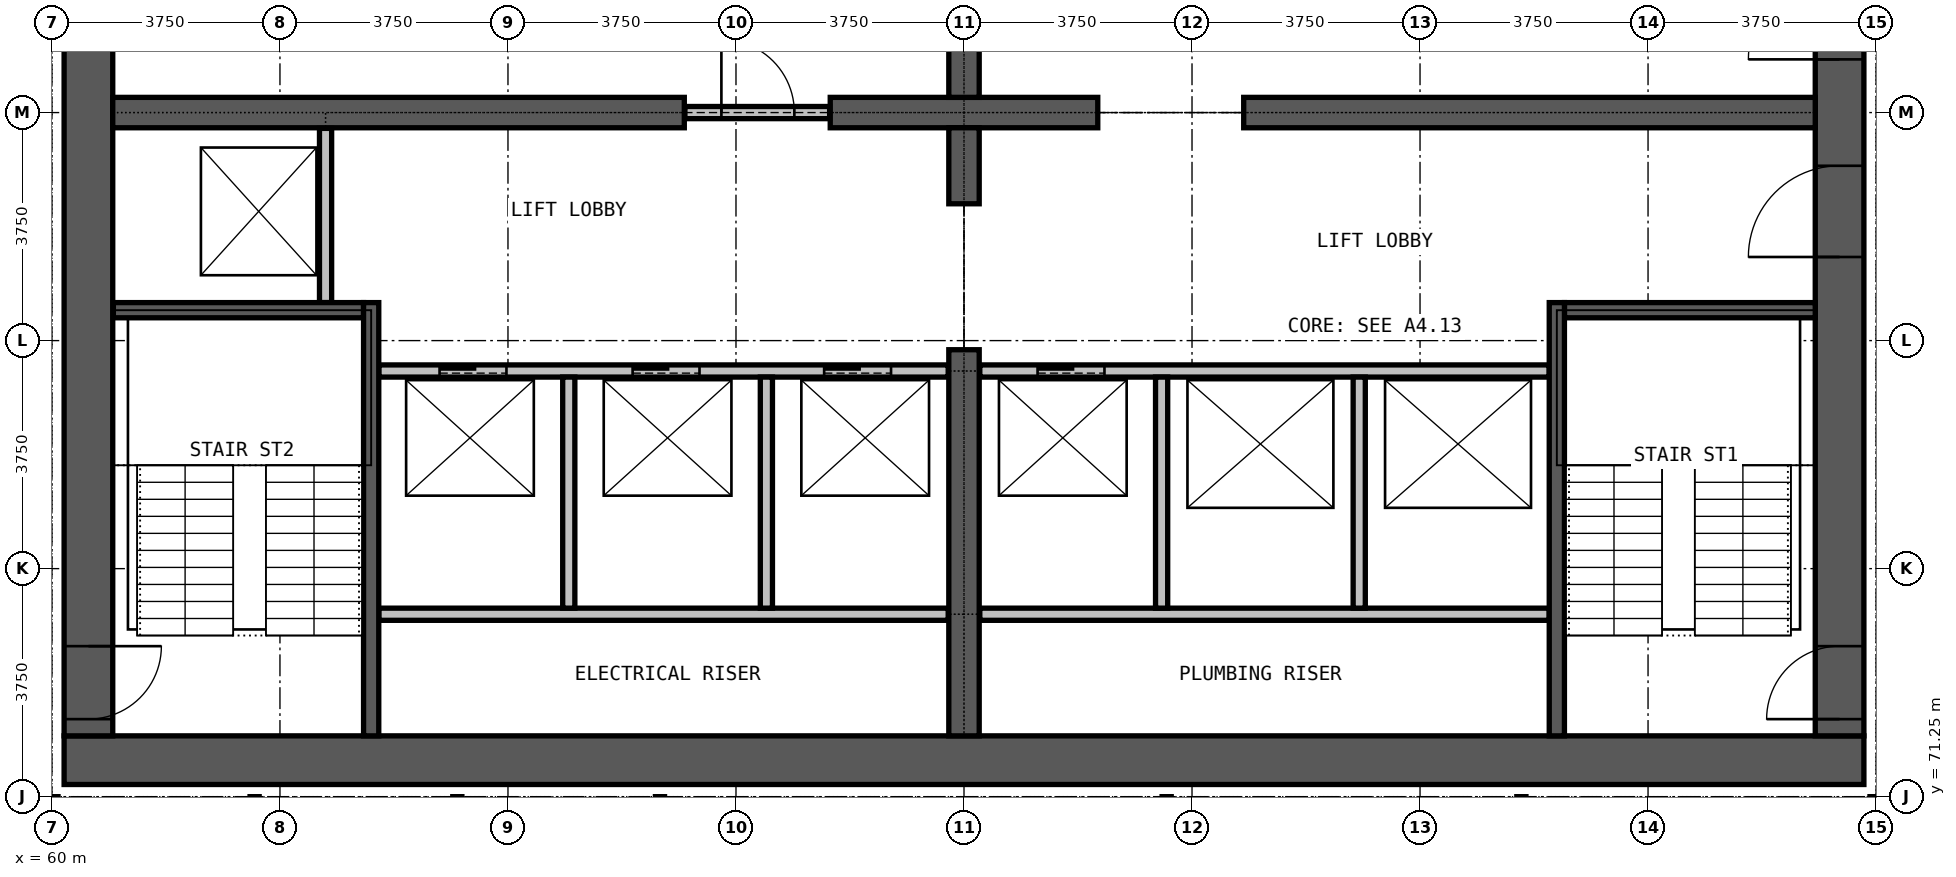
"""IFC4 building model, lengths in metres.
Left out: names, types, materials, properties, quantities, classifications, styles, units other than length and angle.
Written with IfcOpenShell. Run it as: python <this file> out.ifc"""

import sys

from ifc_helpers import new_model, si_unit, direction, frame, frame_2d, origin, place, context, subcontext, project, spatial, rectangle, extrude, element, fill, save


model = new_model("IFC4")
c1 = context("Model", 3, precision=1e-05, world=origin(), true_north=direction((0.0, 1.0)))
c2 = subcontext(c1, "Body", "Model", "MODEL_VIEW")
j1 = project(units=[si_unit("LENGTHUNIT", "METRE"), si_unit("PLANEANGLEUNIT", "RADIAN")], contexts=[c1])
p1 = place(None, origin())
s1 = spatial("IfcSite", under=j1, at=p1, CompositionType="ELEMENT")
p2 = place(p1, origin())
s2 = spatial("IfcBuilding", under=s1, at=p2, CompositionType="ELEMENT")
p3 = place(p2, frame((0.0, 0.0, 125.2)))
s3 = spatial("IfcBuildingStorey", under=s2, at=p3, CompositionType="ELEMENT", Elevation=125.2)
p4 = place(p3, frame((60.2, 71.85, 0.0), z_axis=(0.0, 0.0, 1.0), x_axis=(1.0, 0.0, 0.0)))
e1 = element("IfcWall", 1, at=p4, inside=s3, PredefinedType="SHEAR", context=c2, shape_type="SweptSolid", body=[
    extrude(rectangle(XDim=29.6, YDim=0.8, at=frame_2d((14.8, 0.0))), origin(), (0.0, 0.0, 1.0), 3.6),
])
p5 = place(p3, frame((89.4, 72.25, 0.0), z_axis=(0.0, 0.0, 1.0), x_axis=(0.0, 1.0, 0.0)))
e2 = element("IfcWall", 2, at=p5, inside=s3, PredefinedType="SHEAR", context=c2, shape_type="SweptSolid", body=[
    extrude(rectangle(XDim=20.5, YDim=0.8, at=frame_2d((10.25, 0.0))), origin(), (0.0, 0.0, 1.0), 3.6),
])
p6 = place(p5, frame((0.275, 0.0, 0.0)))
e3 = element("IfcOpeningElement", 3, at=p6, cuts=e2, PredefinedType="OPENING", context=c2, shape_type="SweptSolid", body=[
    extrude(rectangle(XDim=1.2, YDim=2.2, at=frame_2d((0.6, 1.1))), frame((0.0, 0.41, 0.0), z_axis=(0.0, -1.0, 0.0), x_axis=(1.0, 0.0, 0.0)), (0.0, 0.0, 1.0), 0.82),
])
p7 = place(p5, frame((13.775, 0.0, 0.0)))
e4 = element("IfcOpeningElement", 4, at=p7, cuts=e2, PredefinedType="OPENING", context=c2, shape_type="SweptSolid", body=[
    extrude(rectangle(XDim=1.2, YDim=2.2, at=frame_2d((0.6, 1.1))), frame((0.0, 0.41, 0.0), z_axis=(0.0, -1.0, 0.0), x_axis=(1.0, 0.0, 0.0)), (0.0, 0.0, 1.0), 0.82),
])
p8 = place(p5, frame((7.875, 0.0, 0.0)))
e5 = element("IfcOpeningElement", 5, at=p8, cuts=e2, PredefinedType="OPENING", context=c2, shape_type="SweptSolid", body=[
    extrude(rectangle(XDim=1.5, YDim=2.2, at=frame_2d((0.75, 1.1))), frame((0.0, 0.41, 0.0), z_axis=(0.0, -1.0, 0.0), x_axis=(1.0, 0.0, 0.0)), (0.0, 0.0, 1.0), 0.82),
])
p9 = place(p5, frame((11.125, 0.0, 0.0)))
e6 = element("IfcOpeningElement", 6, at=p9, cuts=e2, PredefinedType="OPENING", context=c2, shape_type="SweptSolid", body=[
    extrude(rectangle(XDim=1.5, YDim=2.2, at=frame_2d((0.75, 1.1))), frame((0.0, 0.41, 0.0), z_axis=(0.0, -1.0, 0.0), x_axis=(1.0, 0.0, 0.0)), (0.0, 0.0, 1.0), 0.82),
])
p10 = place(p3, frame((60.6, 92.75, 0.0), z_axis=(0.0, 0.0, 1.0), x_axis=(0.0, -1.0, 0.0)))
e7 = element("IfcWall", 7, at=p10, inside=s3, PredefinedType="SHEAR", context=c2, shape_type="SweptSolid", body=[
    extrude(rectangle(XDim=20.5, YDim=0.8, at=frame_2d((10.25, 0.0))), origin(), (0.0, 0.0, 1.0), 3.6),
])
p11 = place(p10, frame((19.025, 0.0, 0.0)))
e8 = element("IfcOpeningElement", 8, at=p11, cuts=e7, PredefinedType="OPENING", context=c2, shape_type="SweptSolid", body=[
    extrude(rectangle(XDim=1.2, YDim=2.2, at=frame_2d((0.6, 1.1))), frame((0.0, 0.41, 0.0), z_axis=(0.0, -1.0, 0.0), x_axis=(1.0, 0.0, 0.0)), (0.0, 0.0, 1.0), 0.82),
])
p12 = place(p10, frame((8.025, 0.0, 0.0)))
e9 = element("IfcOpeningElement", 9, at=p12, cuts=e7, PredefinedType="OPENING", context=c2, shape_type="SweptSolid", body=[
    extrude(rectangle(XDim=1.2, YDim=2.2, at=frame_2d((0.6, 1.1))), frame((0.0, 0.41, 0.0), z_axis=(0.0, -1.0, 0.0), x_axis=(1.0, 0.0, 0.0)), (0.0, 0.0, 1.0), 0.82),
])
p13 = place(p3, frame((61.0, 82.5, 0.0), z_axis=(0.0, 0.0, 1.0), x_axis=(1.0, 0.0, 0.0)))
e10 = element("IfcWall", 10, at=p13, inside=s3, PredefinedType="SHEAR", context=c2, shape_type="SweptSolid", body=[
    extrude(rectangle(XDim=9.4, YDim=0.5, at=frame_2d((4.7, 0.0))), origin(), (0.0, 0.0, 1.0), 3.6),
])
p14 = place(p3, frame((72.8, 82.5, 0.0), z_axis=(0.0, 0.0, 1.0), x_axis=(1.0, 0.0, 0.0)))
e11 = element("IfcWall", 11, at=p14, inside=s3, PredefinedType="SHEAR", context=c2, shape_type="SweptSolid", body=[
    extrude(rectangle(XDim=4.4, YDim=0.5, at=frame_2d((2.2, 0.0))), origin(), (0.0, 0.0, 1.0), 3.6),
])
p15 = place(p3, frame((79.6, 82.5, 0.0), z_axis=(0.0, 0.0, 1.0), x_axis=(1.0, 0.0, 0.0)))
e12 = element("IfcWall", 12, at=p15, inside=s3, PredefinedType="SHEAR", context=c2, shape_type="SweptSolid", body=[
    extrude(rectangle(XDim=9.4, YDim=0.5, at=frame_2d((4.7, 0.0))), origin(), (0.0, 0.0, 1.0), 3.6),
])
p16 = place(p3, frame((75.0, 72.25, 0.0), z_axis=(0.0, 0.0, 1.0), x_axis=(0.0, 1.0, 0.0)))
e13 = element("IfcWall", 13, at=p16, inside=s3, PredefinedType="SHEAR", context=c2, shape_type="SweptSolid", body=[
    extrude(rectangle(XDim=6.35, YDim=0.5, at=frame_2d((3.175, 0.0))), origin(), (0.0, 0.0, 1.0), 3.6),
])
for number, where, z_axis, x_axis in (
    (14, (75.0, 81.0, 0.0), (0.0, 0.0, 1.0), (0.0, 1.0, 0.0)),
    (15, (75.0, 82.75, 0.0), (0.0, 0.0, 1.0), (0.0, 1.0, 0.0)),
):
    element("IfcWall", number, at=place(p3, frame(where, z_axis=z_axis, x_axis=x_axis)), inside=s3, PredefinedType="SHEAR", context=c2, shape_type="SweptSolid", body=[
        extrude(rectangle(XDim=1.25, YDim=0.5, at=frame_2d((0.625, 0.0))), origin(), (0.0, 0.0, 1.0), 3.6),
    ])
p17 = place(p3, frame((70.41, 82.5, 0.0), z_axis=(0.0, 0.0, 1.0), x_axis=(1.0, 0.0, 0.0)))
e16 = element("IfcWall", 16, at=p17, inside=s3, PredefinedType="PARTITIONING", context=c2, shape_type="SweptSolid", body=[
    extrude(rectangle(XDim=2.38, YDim=0.2, at=frame_2d((1.19, 0.0))), origin(), (0.0, 0.0, 1.0), 2.4),
])
p18 = place(p17, frame((0.6, 0.0, 0.0)))
e17 = element("IfcOpeningElement", 17, at=p18, cuts=e16, PredefinedType="OPENING", context=c2, shape_type="SweptSolid", body=[
    extrude(rectangle(XDim=1.2, YDim=2.2, at=frame_2d((0.6, 1.1))), frame((0.0, 0.11, 0.0), z_axis=(0.0, -1.0, 0.0), x_axis=(1.0, 0.0, 0.0)), (0.0, 0.0, 1.0), 0.22),
])
for number, where, z_axis, x_axis in (
    (18, (65.375, 74.25, 0.0), (0.0, 0.0, 1.0), (1.0, 0.0, 0.0)),
    (19, (75.26, 74.25, 0.0), (0.0, 0.0, 1.0), (1.0, 0.0, 0.0)),
):
    element("IfcWall", number, at=place(p3, frame(where, z_axis=z_axis, x_axis=x_axis)), inside=s3, PredefinedType="PARTITIONING", context=c2, shape_type="SweptSolid", body=[
        extrude(rectangle(XDim=9.365, YDim=0.2, at=frame_2d((4.683, 0.0))), origin(), (0.0, 0.0, 1.0), 3.3),
    ])
p19 = place(p3, frame((65.375, 78.25, 0.0), z_axis=(0.0, 0.0, 1.0), x_axis=(1.0, 0.0, 0.0)))
e20 = element("IfcWall", 20, at=p19, inside=s3, PredefinedType="PARTITIONING", context=c2, shape_type="SweptSolid", body=[
    extrude(rectangle(XDim=9.365, YDim=0.2, at=frame_2d((4.683, 0.0))), origin(), (0.0, 0.0, 1.0), 3.3),
])
p20 = place(p19, frame((1.0, 0.0, 0.0)))
e21 = element("IfcOpeningElement", 21, at=p20, cuts=e20, PredefinedType="OPENING", context=c2, shape_type="SweptSolid", body=[
    extrude(rectangle(XDim=1.1, YDim=2.2, at=frame_2d((0.55, 1.1))), frame((0.0, 0.11, 0.0), z_axis=(0.0, -1.0, 0.0), x_axis=(1.0, 0.0, 0.0)), (0.0, 0.0, 1.0), 0.22),
])
p21 = place(p19, frame((4.175, 0.0, 0.0)))
e22 = element("IfcOpeningElement", 22, at=p21, cuts=e20, PredefinedType="OPENING", context=c2, shape_type="SweptSolid", body=[
    extrude(rectangle(XDim=1.1, YDim=2.2, at=frame_2d((0.55, 1.1))), frame((0.0, 0.11, 0.0), z_axis=(0.0, -1.0, 0.0), x_axis=(1.0, 0.0, 0.0)), (0.0, 0.0, 1.0), 0.22),
])
p22 = place(p19, frame((7.325, 0.0, 0.0)))
e23 = element("IfcOpeningElement", 23, at=p22, cuts=e20, PredefinedType="OPENING", context=c2, shape_type="SweptSolid", body=[
    extrude(rectangle(XDim=1.1, YDim=2.2, at=frame_2d((0.55, 1.1))), frame((0.0, 0.11, 0.0), z_axis=(0.0, -1.0, 0.0), x_axis=(1.0, 0.0, 0.0)), (0.0, 0.0, 1.0), 0.22),
])
p23 = place(p3, frame((75.26, 78.25, 0.0), z_axis=(0.0, 0.0, 1.0), x_axis=(1.0, 0.0, 0.0)))
e24 = element("IfcWall", 24, at=p23, inside=s3, PredefinedType="PARTITIONING", context=c2, shape_type="SweptSolid", body=[
    extrude(rectangle(XDim=9.365, YDim=0.2, at=frame_2d((4.683, 0.0))), origin(), (0.0, 0.0, 1.0), 3.3),
])
p24 = place(p23, frame((0.95, 0.0, 0.0)))
e25 = element("IfcOpeningElement", 25, at=p24, cuts=e24, PredefinedType="OPENING", context=c2, shape_type="SweptSolid", body=[
    extrude(rectangle(XDim=1.1, YDim=2.2, at=frame_2d((0.55, 1.1))), frame((0.0, 0.11, 0.0), z_axis=(0.0, -1.0, 0.0), x_axis=(1.0, 0.0, 0.0)), (0.0, 0.0, 1.0), 0.22),
])
p25 = place(p3, frame((64.5, 79.375, 0.0), z_axis=(0.0, 0.0, 1.0), x_axis=(0.0, 1.0, 0.0)))
e26 = element("IfcWall", 26, at=p25, inside=s3, PredefinedType="PARTITIONING", context=c2, shape_type="SweptSolid", body=[
    extrude(rectangle(XDim=2.865, YDim=0.2, at=frame_2d((1.433, 0.0))), origin(), (0.0, 0.0, 1.0), 3.3),
])
for number, where, z_axis, x_axis in (
    (27, (68.5, 74.35, 0.0), (0.0, 0.0, 1.0), (0.0, 1.0, 0.0)),
    (28, (71.75, 74.35, 0.0), (0.0, 0.0, 1.0), (0.0, 1.0, 0.0)),
    (29, (78.25, 74.35, 0.0), (0.0, 0.0, 1.0), (0.0, 1.0, 0.0)),
    (30, (81.5, 74.35, 0.0), (0.0, 0.0, 1.0), (0.0, 1.0, 0.0)),
):
    element("IfcWall", number, at=place(p3, frame(where, z_axis=z_axis, x_axis=x_axis)), inside=s3, PredefinedType="PARTITIONING", context=c2, shape_type="SweptSolid", body=[
        extrude(rectangle(XDim=3.8, YDim=0.2, at=frame_2d((1.9, 0.0))), origin(), (0.0, 0.0, 1.0), 3.3),
    ])
p26 = place(p3, frame((61.01, 79.25, 0.0), z_axis=(0.0, 0.0, 1.0), x_axis=(1.0, 0.0, 0.0)))
e31 = element("IfcWall", 31, at=p26, inside=s3, PredefinedType="PARTITIONING", context=c2, shape_type="SweptSolid", body=[
    extrude(rectangle(XDim=4.115, YDim=0.25, at=frame_2d((2.058, 0.0))), origin(), (0.0, 0.0, 1.0), 3.3),
])
p27 = place(p3, frame((84.875, 79.25, 0.0), z_axis=(0.0, 0.0, 1.0), x_axis=(1.0, 0.0, 0.0)))
e32 = element("IfcWall", 32, at=p27, inside=s3, PredefinedType="PARTITIONING", context=c2, shape_type="SweptSolid", body=[
    extrude(rectangle(XDim=4.125, YDim=0.25, at=frame_2d((2.062, 0.0))), origin(), (0.0, 0.0, 1.0), 3.3),
])
for number, where, z_axis, x_axis in (
    (33, (65.25, 72.25, 0.0), (0.0, 0.0, 1.0), (0.0, 1.0, 0.0)),
    (34, (84.75, 72.25, 0.0), (0.0, 0.0, 1.0), (0.0, 1.0, 0.0)),
):
    element("IfcWall", number, at=place(p3, frame(where, z_axis=z_axis, x_axis=x_axis)), inside=s3, PredefinedType="PARTITIONING", context=c2, shape_type="SweptSolid", body=[
        extrude(rectangle(XDim=7.125, YDim=0.25, at=frame_2d((3.562, 0.0))), origin(), (0.0, 0.0, 1.0), 3.3),
    ])
p28 = place(p20, origin())
e35 = element("IfcDoor", 35, at=p28, inside=s3, OperationType="DOUBLE_DOOR_SLIDING", PredefinedType="DOOR", context=c2, shape_type="SweptSolid", body=[
    extrude(rectangle(XDim=1.1, YDim=2.2, at=frame_2d((0.55, 1.1))), frame((0.0, 0.025, 0.0), z_axis=(0.0, -1.0, 0.0), x_axis=(1.0, 0.0, 0.0)), (0.0, 0.0, 1.0), 0.05),
])
fill(e21, e35)
p29 = place(p21, origin())
e36 = element("IfcDoor", 36, at=p29, inside=s3, OperationType="DOUBLE_DOOR_SLIDING", PredefinedType="DOOR", context=c2, shape_type="SweptSolid", body=[
    extrude(rectangle(XDim=1.1, YDim=2.2, at=frame_2d((0.55, 1.1))), frame((0.0, 0.025, 0.0), z_axis=(0.0, -1.0, 0.0), x_axis=(1.0, 0.0, 0.0)), (0.0, 0.0, 1.0), 0.05),
])
fill(e22, e36)
p30 = place(p22, origin())
e37 = element("IfcDoor", 37, at=p30, inside=s3, OperationType="DOUBLE_DOOR_SLIDING", PredefinedType="DOOR", context=c2, shape_type="SweptSolid", body=[
    extrude(rectangle(XDim=1.1, YDim=2.2, at=frame_2d((0.55, 1.1))), frame((0.0, 0.025, 0.0), z_axis=(0.0, -1.0, 0.0), x_axis=(1.0, 0.0, 0.0)), (0.0, 0.0, 1.0), 0.05),
])
fill(e23, e37)
p31 = place(p24, origin())
e38 = element("IfcDoor", 38, at=p31, inside=s3, OperationType="DOUBLE_DOOR_SLIDING", PredefinedType="DOOR", context=c2, shape_type="SweptSolid", body=[
    extrude(rectangle(XDim=1.1, YDim=2.2, at=frame_2d((0.55, 1.1))), frame((0.0, 0.025, 0.0), z_axis=(0.0, -1.0, 0.0), x_axis=(1.0, 0.0, 0.0)), (0.0, 0.0, 1.0), 0.05),
])
fill(e25, e38)
p32 = place(p18, origin())
e39 = element("IfcDoor", 39, at=p32, inside=s3, OperationType="SINGLE_SWING_LEFT", PredefinedType="DOOR", context=c2, shape_type="SweptSolid", body=[
    extrude(rectangle(XDim=1.2, YDim=2.2, at=frame_2d((0.6, 1.1))), frame((0.0, 0.025, 0.0), z_axis=(0.0, -1.0, 0.0), x_axis=(1.0, 0.0, 0.0)), (0.0, 0.0, 1.0), 0.05),
])
fill(e17, e39)
p33 = place(p6, origin())
e40 = element("IfcDoor", 40, at=p33, inside=s3, OperationType="SINGLE_SWING_LEFT", PredefinedType="DOOR", context=c2, shape_type="SweptSolid", body=[
    extrude(rectangle(XDim=1.2, YDim=2.2, at=frame_2d((0.6, 1.1))), frame((0.0, 0.025, 0.0), z_axis=(0.0, -1.0, 0.0), x_axis=(1.0, 0.0, 0.0)), (0.0, 0.0, 1.0), 0.05),
])
fill(e3, e40)
p34 = place(p11, origin())
e41 = element("IfcDoor", 41, at=p34, inside=s3, OperationType="SINGLE_SWING_RIGHT", PredefinedType="DOOR", context=c2, shape_type="SweptSolid", body=[
    extrude(rectangle(XDim=1.2, YDim=2.2, at=frame_2d((0.6, 1.1))), frame((0.0, 0.025, 0.0), z_axis=(0.0, -1.0, 0.0), x_axis=(1.0, 0.0, 0.0)), (0.0, 0.0, 1.0), 0.05),
])
fill(e8, e41)
p35 = place(p8, origin())
e42 = element("IfcDoor", 42, at=p35, inside=s3, OperationType="DOUBLE_DOOR_SINGLE_SWING", PredefinedType="DOOR", context=c2, shape_type="SweptSolid", body=[
    extrude(rectangle(XDim=1.5, YDim=2.2, at=frame_2d((0.75, 1.1))), frame((0.0, 0.025, 0.0), z_axis=(0.0, -1.0, 0.0), x_axis=(1.0, 0.0, 0.0)), (0.0, 0.0, 1.0), 0.05),
])
fill(e5, e42)
p36 = place(p9, origin())
e43 = element("IfcDoor", 43, at=p36, inside=s3, OperationType="DOUBLE_DOOR_SINGLE_SWING", PredefinedType="DOOR", context=c2, shape_type="SweptSolid", body=[
    extrude(rectangle(XDim=1.5, YDim=2.2, at=frame_2d((0.75, 1.1))), frame((0.0, 0.025, 0.0), z_axis=(0.0, -1.0, 0.0), x_axis=(1.0, 0.0, 0.0)), (0.0, 0.0, 1.0), 0.05),
])
fill(e6, e43)
save(model, sys.argv[1])
